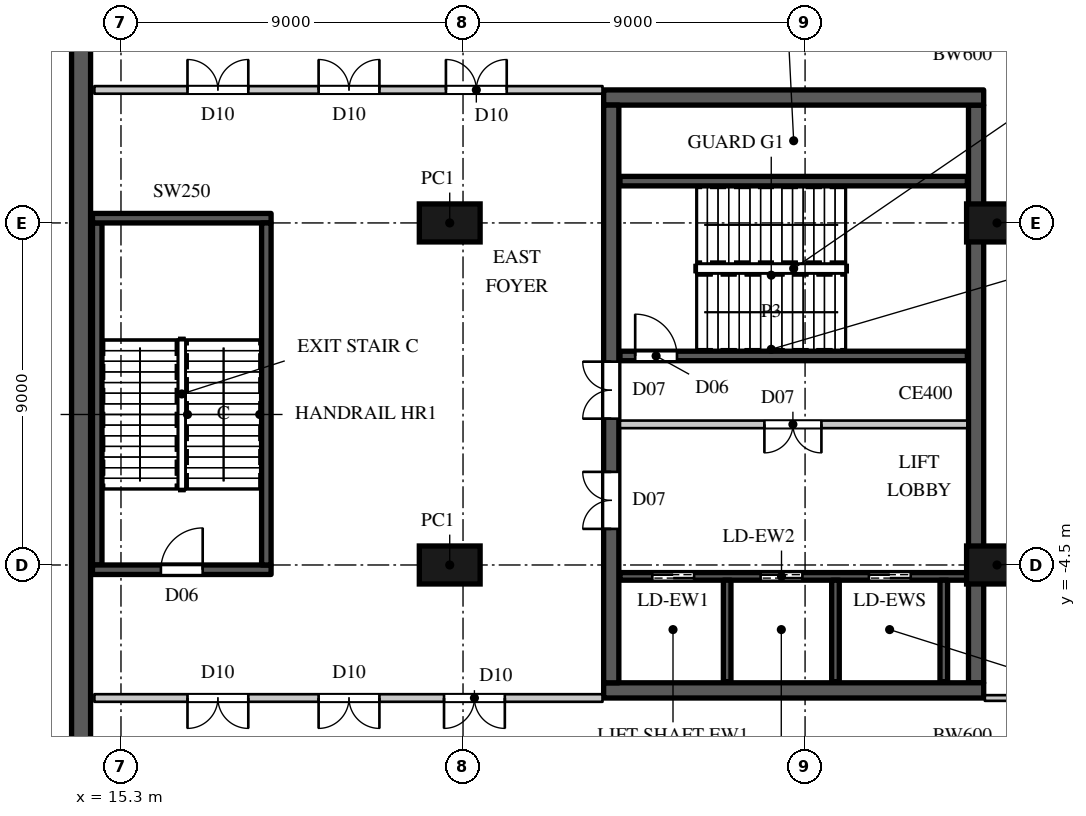
"""IFC4 building model, lengths in metres.
Left out: names, types, materials, properties, quantities, classifications, styles, units other than length and angle.
Written with IfcOpenShell. Run it as: python <this file> out.ifc"""

import sys

from ifc_helpers import new_model, si_unit, direction, frame, frame_2d, origin, origin_2d, place, context, subcontext, project, spatial, rectangle, extrude, element, fill, save


model = new_model("IFC4")
c1 = context("Model", 3, precision=1e-05, world=origin(), true_north=direction((0.0, 1.0)))
c2 = subcontext(c1, "Body", "Model", "MODEL_VIEW")
j1 = project(units=[si_unit("LENGTHUNIT", "METRE"), si_unit("PLANEANGLEUNIT", "RADIAN")], contexts=[c1])
p1 = place(None, origin())
s1 = spatial("IfcSite", under=j1, at=p1, CompositionType="ELEMENT")
p2 = place(p1, origin())
s2 = spatial("IfcBuilding", under=s1, at=p2, CompositionType="ELEMENT")
p3 = place(p2, frame((0.0, 0.0, 9.0)))
s3 = spatial("IfcBuildingStorey", under=s2, at=p3, CompositionType="ELEMENT", Elevation=9.0)
p4 = place(p3, frame((14.25, -19.5, 0.0), z_axis=(0.0, 0.0, 1.0), x_axis=(0.0, 1.0, 0.0)))
e1 = element("IfcWall", 1, at=p4, inside=s3, PredefinedType="SOLIDWALL", context=c2, shape_type="SweptSolid", body=[
    extrude(rectangle(XDim=39.0, YDim=0.5, at=frame_2d((19.5, 0.0))), origin(), (0.0, 0.0, 1.0), 10.0),
])
for number, where, z_axis, x_axis in (
    (2, (23.95, -4.5, 0.0), (0.0, 0.0, 1.0), (0.0, 1.0, 0.0)),
    (3, (23.95, 4.5, 0.0), (0.0, 0.0, 1.0), (0.0, 1.0, 0.0)),
    (4, (38.35, -4.5, 0.0), (0.0, 0.0, 1.0), (0.0, 1.0, 0.0)),
    (5, (38.35, 4.5, 0.0), (0.0, 0.0, 1.0), (0.0, 1.0, 0.0)),
):
    element("IfcColumn", number, at=place(p3, frame(where, z_axis=z_axis, x_axis=x_axis)), inside=s3, PredefinedType="COLUMN", context=c2, shape_type="SweptSolid", body=[
        extrude(rectangle(XDim=1.0, YDim=1.6, at=origin_2d()), origin(), (0.0, 0.0, 1.0), 10.0),
    ])
for number, where, z_axis, x_axis in (
    (6, (28.0, 7.8, 0.0), (0.0, 0.0, 1.0), (1.0, 0.0, 0.0)),
    (7, (28.0, -7.8, 0.0), (0.0, 0.0, 1.0), (1.0, 0.0, 0.0)),
):
    element("IfcWall", number, at=place(p3, frame(where, z_axis=z_axis, x_axis=x_axis)), inside=s3, PredefinedType="SHEAR", context=c2, shape_type="SweptSolid", body=[
        extrude(rectangle(XDim=10.0, YDim=0.4, at=frame_2d((5.0, 0.0))), origin(), (0.0, 0.0, 1.0), 10.0),
    ])
p5 = place(p3, frame((37.8, -7.6, 0.0), z_axis=(0.0, 0.0, 1.0), x_axis=(0.0, 1.0, 0.0)))
e8 = element("IfcWall", 8, at=p5, inside=s3, PredefinedType="SHEAR", context=c2, shape_type="SweptSolid", body=[
    extrude(rectangle(XDim=15.2, YDim=0.4, at=frame_2d((7.6, 0.0))), origin(), (0.0, 0.0, 1.0), 10.0),
])
p6 = place(p3, frame((28.2, -7.6, 0.0), z_axis=(0.0, 0.0, 1.0), x_axis=(0.0, 1.0, 0.0)))
e9 = element("IfcWall", 9, at=p6, inside=s3, PredefinedType="SHEAR", context=c2, shape_type="SweptSolid", body=[
    extrude(rectangle(XDim=15.2, YDim=0.4, at=frame_2d((7.6, 0.0))), origin(), (0.0, 0.0, 1.0), 10.0),
])
p7 = place(p6, frame((4.05, 0.0, 0.0)))
e10 = element("IfcOpeningElement", 10, at=p7, cuts=e9, PredefinedType="OPENING", context=c2, shape_type="SweptSolid", body=[
    extrude(rectangle(XDim=1.5, YDim=2.4, at=frame_2d((0.75, 1.2))), frame((0.0, 0.21, 0.0), z_axis=(0.0, -1.0, 0.0), x_axis=(1.0, 0.0, 0.0)), (0.0, 0.0, 1.0), 0.42),
])
p8 = place(p6, frame((6.95, 0.0, 0.0)))
e11 = element("IfcOpeningElement", 11, at=p8, cuts=e9, PredefinedType="OPENING", context=c2, shape_type="SweptSolid", body=[
    extrude(rectangle(XDim=1.5, YDim=2.4, at=frame_2d((0.75, 1.2))), frame((0.0, 0.21, 0.0), z_axis=(0.0, -1.0, 0.0), x_axis=(1.0, 0.0, 0.0)), (0.0, 0.0, 1.0), 0.42),
])
p9 = place(p3, frame((14.6, -8.0, 0.0), z_axis=(0.0, 0.0, 1.0), x_axis=(1.0, 0.0, 0.0)))
e12 = element("IfcWall", 12, at=p9, inside=s3, PredefinedType="PARTITIONING", context=c2, shape_type="SweptSolid", body=[
    extrude(rectangle(XDim=13.37, YDim=0.2, at=frame_2d((6.685, 0.0))), origin(), (0.0, 0.0, 1.0), 9.598),
])
p10 = place(p9, frame((5.9, 0.0, 0.0)))
e13 = element("IfcOpeningElement", 13, at=p10, cuts=e12, PredefinedType="OPENING", context=c2, shape_type="SweptSolid", body=[
    extrude(rectangle(XDim=1.6, YDim=2.4, at=frame_2d((0.8, 1.2))), frame((0.0, 0.11, 0.0), z_axis=(0.0, -1.0, 0.0), x_axis=(1.0, 0.0, 0.0)), (0.0, 0.0, 1.0), 0.22),
])
p11 = place(p9, frame((9.2, 0.0, 0.0)))
e14 = element("IfcOpeningElement", 14, at=p11, cuts=e12, PredefinedType="OPENING", context=c2, shape_type="SweptSolid", body=[
    extrude(rectangle(XDim=1.6, YDim=2.4, at=frame_2d((0.8, 1.2))), frame((0.0, 0.11, 0.0), z_axis=(0.0, -1.0, 0.0), x_axis=(1.0, 0.0, 0.0)), (0.0, 0.0, 1.0), 0.22),
])
p12 = place(p9, frame((2.45, 0.0, 0.0)))
e15 = element("IfcOpeningElement", 15, at=p12, cuts=e12, PredefinedType="OPENING", context=c2, shape_type="SweptSolid", body=[
    extrude(rectangle(XDim=1.6, YDim=2.4, at=frame_2d((0.8, 1.2))), frame((0.0, 0.11, 0.0), z_axis=(0.0, -1.0, 0.0), x_axis=(1.0, 0.0, 0.0)), (0.0, 0.0, 1.0), 0.22),
])
p13 = place(p3, frame((14.6, 8.0, 0.0), z_axis=(0.0, 0.0, 1.0), x_axis=(1.0, 0.0, 0.0)))
e16 = element("IfcWall", 16, at=p13, inside=s3, PredefinedType="PARTITIONING", context=c2, shape_type="SweptSolid", body=[
    extrude(rectangle(XDim=13.37, YDim=0.2, at=frame_2d((6.685, 0.0))), origin(), (0.0, 0.0, 1.0), 9.598),
])
p14 = place(p13, frame((5.9, 0.0, 0.0)))
e17 = element("IfcOpeningElement", 17, at=p14, cuts=e16, PredefinedType="OPENING", context=c2, shape_type="SweptSolid", body=[
    extrude(rectangle(XDim=1.6, YDim=2.4, at=frame_2d((0.8, 1.2))), frame((0.0, 0.11, 0.0), z_axis=(0.0, -1.0, 0.0), x_axis=(1.0, 0.0, 0.0)), (0.0, 0.0, 1.0), 0.22),
])
p15 = place(p13, frame((2.45, 0.0, 0.0)))
e18 = element("IfcOpeningElement", 18, at=p15, cuts=e16, PredefinedType="OPENING", context=c2, shape_type="SweptSolid", body=[
    extrude(rectangle(XDim=1.6, YDim=2.4, at=frame_2d((0.8, 1.2))), frame((0.0, 0.11, 0.0), z_axis=(0.0, -1.0, 0.0), x_axis=(1.0, 0.0, 0.0)), (0.0, 0.0, 1.0), 0.22),
])
p16 = place(p13, frame((9.25, 0.0, 0.0)))
e19 = element("IfcOpeningElement", 19, at=p16, cuts=e16, PredefinedType="OPENING", context=c2, shape_type="SweptSolid", body=[
    extrude(rectangle(XDim=1.6, YDim=2.4, at=frame_2d((0.8, 1.2))), frame((0.0, 0.11, 0.0), z_axis=(0.0, -1.0, 0.0), x_axis=(1.0, 0.0, 0.0)), (0.0, 0.0, 1.0), 0.22),
])
p17 = place(p3, frame((28.43, -0.8, 0.0), z_axis=(0.0, 0.0, 1.0), x_axis=(1.0, 0.0, 0.0)))
e20 = element("IfcWall", 20, at=p17, inside=s3, PredefinedType="PARTITIONING", context=c2, shape_type="SweptSolid", body=[
    extrude(rectangle(XDim=9.14, YDim=0.2, at=frame_2d((4.57, 0.0))), origin(), (0.0, 0.0, 1.0), 9.598),
])
p18 = place(p17, frame((3.8, 0.0, 0.0)))
e21 = element("IfcOpeningElement", 21, at=p18, cuts=e20, PredefinedType="OPENING", context=c2, shape_type="SweptSolid", body=[
    extrude(rectangle(XDim=1.5, YDim=2.4, at=frame_2d((0.75, 1.2))), frame((0.0, 0.11, 0.0), z_axis=(0.0, -1.0, 0.0), x_axis=(1.0, 0.0, 0.0)), (0.0, 0.0, 1.0), 0.22),
])
p19 = place(p3, frame((38.03, -8.0, 0.0), z_axis=(0.0, 0.0, 1.0), x_axis=(1.0, 0.0, 0.0)))
e22 = element("IfcWall", 22, at=p19, inside=s3, PredefinedType="PARTITIONING", context=c2, shape_type="SweptSolid", body=[
    extrude(rectangle(XDim=0.595, YDim=0.15, at=frame_2d((0.297, 0.0))), origin(), (0.0, 0.0, 1.0), 9.598),
])
p20 = place(p3, frame((28.43, -4.8, 0.0), z_axis=(0.0, 0.0, 1.0), x_axis=(1.0, 0.0, 0.0)))
e23 = element("IfcWall", 23, at=p20, inside=s3, PredefinedType="SHEAR", context=c2, shape_type="SweptSolid", body=[
    extrude(rectangle(XDim=9.13, YDim=0.2, at=frame_2d((4.565, 0.0))), origin(), (0.0, 0.0, 1.0), 9.598),
])
p21 = place(p20, frame((0.85, 0.0, 0.0)))
e24 = element("IfcOpeningElement", 24, at=p21, cuts=e23, PredefinedType="OPENING", context=c2, shape_type="SweptSolid", body=[
    extrude(rectangle(XDim=1.1, YDim=2.2, at=frame_2d((0.55, 1.1))), frame((0.0, 0.11, 0.0), z_axis=(0.0, -1.0, 0.0), x_axis=(1.0, 0.0, 0.0)), (0.0, 0.0, 1.0), 0.22),
])
p22 = place(p20, frame((3.7, 0.0, 0.0)))
e25 = element("IfcOpeningElement", 25, at=p22, cuts=e23, PredefinedType="OPENING", context=c2, shape_type="SweptSolid", body=[
    extrude(rectangle(XDim=1.1, YDim=2.2, at=frame_2d((0.55, 1.1))), frame((0.0, 0.11, 0.0), z_axis=(0.0, -1.0, 0.0), x_axis=(1.0, 0.0, 0.0)), (0.0, 0.0, 1.0), 0.22),
])
p23 = place(p20, frame((6.55, 0.0, 0.0)))
e26 = element("IfcOpeningElement", 26, at=p23, cuts=e23, PredefinedType="OPENING", context=c2, shape_type="SweptSolid", body=[
    extrude(rectangle(XDim=1.1, YDim=2.2, at=frame_2d((0.55, 1.1))), frame((0.0, 0.11, 0.0), z_axis=(0.0, -1.0, 0.0), x_axis=(1.0, 0.0, 0.0)), (0.0, 0.0, 1.0), 0.22),
])
for number, where, z_axis, x_axis in (
    (27, (31.25, -7.57, 0.0), (0.0, 0.0, 1.0), (0.0, 1.0, 0.0)),
    (28, (34.1, -7.57, 0.0), (0.0, 0.0, 1.0), (0.0, 1.0, 0.0)),
):
    element("IfcWall", number, at=place(p3, frame(where, z_axis=z_axis, x_axis=x_axis)), inside=s3, PredefinedType="SHEAR", context=c2, shape_type="SweptSolid", body=[
        extrude(rectangle(XDim=2.67, YDim=0.2, at=frame_2d((1.335, 0.0))), origin(), (0.0, 0.0, 1.0), 10.0),
    ])
p24 = place(p3, frame((36.95, -7.57, 0.0), z_axis=(0.0, 0.0, 1.0), x_axis=(0.0, 1.0, 0.0)))
e29 = element("IfcWall", 29, at=p24, inside=s3, PredefinedType="SHEAR", context=c2, shape_type="SweptSolid", body=[
    extrude(rectangle(XDim=2.67, YDim=0.2, at=frame_2d((1.335, 0.0))), origin(), (0.0, 0.0, 1.0), 9.598),
])
p25 = place(p3, frame((14.675, -4.5, 0.0), z_axis=(0.0, 0.0, 1.0), x_axis=(0.0, 1.0, 0.0)))
e30 = element("IfcWall", 30, at=p25, inside=s3, PredefinedType="SHEAR", context=c2, shape_type="SweptSolid", body=[
    extrude(rectangle(XDim=9.0, YDim=0.25, at=frame_2d((4.5, 0.0))), origin(), (0.0, 0.0, 1.0), 9.6),
])
p26 = place(p3, frame((14.55, -4.625, 0.0), z_axis=(0.0, 0.0, 1.0), x_axis=(1.0, 0.0, 0.0)))
e31 = element("IfcWall", 31, at=p26, inside=s3, PredefinedType="SHEAR", context=c2, shape_type="SweptSolid", body=[
    extrude(rectangle(XDim=4.7, YDim=0.25, at=frame_2d((2.35, 0.0))), origin(), (0.0, 0.0, 1.0), 9.6),
])
p27 = place(p26, frame((1.8, 0.0, 0.0)))
e32 = element("IfcOpeningElement", 32, at=p27, cuts=e31, PredefinedType="OPENING", context=c2, shape_type="SweptSolid", body=[
    extrude(rectangle(XDim=1.1, YDim=2.2, at=frame_2d((0.55, 1.1))), frame((0.0, 0.135, 0.0), z_axis=(0.0, -1.0, 0.0), x_axis=(1.0, 0.0, 0.0)), (0.0, 0.0, 1.0), 0.27),
])
p28 = place(p3, frame((14.55, 4.625, 0.0), z_axis=(0.0, 0.0, 1.0), x_axis=(1.0, 0.0, 0.0)))
e33 = element("IfcWall", 33, at=p28, inside=s3, PredefinedType="SHEAR", context=c2, shape_type="SweptSolid", body=[
    extrude(rectangle(XDim=4.7, YDim=0.25, at=frame_2d((2.35, 0.0))), origin(), (0.0, 0.0, 1.0), 9.6),
])
p29 = place(p3, frame((19.125, -4.5, 0.0), z_axis=(0.0, 0.0, 1.0), x_axis=(0.0, 1.0, 0.0)))
e34 = element("IfcWall", 34, at=p29, inside=s3, PredefinedType="SHEAR", context=c2, shape_type="SweptSolid", body=[
    extrude(rectangle(XDim=9.0, YDim=0.25, at=frame_2d((4.5, 0.0))), origin(), (0.0, 0.0, 1.0), 9.6),
])
p30 = place(p3, frame((28.43, 1.0, 0.0), z_axis=(0.0, 0.0, 1.0), x_axis=(1.0, 0.0, 0.0)))
e35 = element("IfcWall", 35, at=p30, inside=s3, PredefinedType="SHEAR", context=c2, shape_type="SweptSolid", body=[
    extrude(rectangle(XDim=9.14, YDim=0.25, at=frame_2d((4.57, 0.0))), origin(), (0.0, 0.0, 1.0), 9.598),
])
p31 = place(p30, frame((0.4, 0.0, 0.0)))
e36 = element("IfcOpeningElement", 36, at=p31, cuts=e35, PredefinedType="OPENING", context=c2, shape_type="SweptSolid", body=[
    extrude(rectangle(XDim=1.1, YDim=2.2, at=frame_2d((0.55, 1.1))), frame((0.0, 0.135, 0.0), z_axis=(0.0, -1.0, 0.0), x_axis=(1.0, 0.0, 0.0)), (0.0, 0.0, 1.0), 0.27),
])
p32 = place(p3, frame((28.43, 5.6, 0.0), z_axis=(0.0, 0.0, 1.0), x_axis=(1.0, 0.0, 0.0)))
e37 = element("IfcWall", 37, at=p32, inside=s3, PredefinedType="SHEAR", context=c2, shape_type="SweptSolid", body=[
    extrude(rectangle(XDim=9.14, YDim=0.25, at=frame_2d((4.57, 0.0))), origin(), (0.0, 0.0, 1.0), 9.598),
])
p33 = place(p31, origin())
e38 = element("IfcDoor", 38, at=p33, inside=s3, OperationType="SINGLE_SWING_LEFT", PredefinedType="DOOR", context=c2, shape_type="SweptSolid", body=[
    extrude(rectangle(XDim=1.1, YDim=2.2, at=frame_2d((0.55, 1.1))), frame((0.0, 0.025, 0.0), z_axis=(0.0, -1.0, 0.0), x_axis=(1.0, 0.0, 0.0)), (0.0, 0.0, 1.0), 0.05),
])
fill(e36, e38)
p34 = place(p18, origin())
e39 = element("IfcDoor", 39, at=p34, inside=s3, OperationType="DOUBLE_DOOR_SINGLE_SWING", PredefinedType="DOOR", context=c2, shape_type="SweptSolid", body=[
    extrude(rectangle(XDim=1.5, YDim=2.4, at=frame_2d((0.75, 1.2))), frame((0.0, 0.025, 0.0), z_axis=(0.0, -1.0, 0.0), x_axis=(1.0, 0.0, 0.0)), (0.0, 0.0, 1.0), 0.05),
])
fill(e21, e39)
p35 = place(p21, origin())
e40 = element("IfcDoor", 40, at=p35, inside=s3, OperationType="DOUBLE_DOOR_SLIDING", PredefinedType="DOOR", context=c2, shape_type="SweptSolid", body=[
    extrude(rectangle(XDim=1.1, YDim=2.2, at=frame_2d((0.55, 1.1))), frame((0.0, 0.025, 0.0), z_axis=(0.0, -1.0, 0.0), x_axis=(1.0, 0.0, 0.0)), (0.0, 0.0, 1.0), 0.05),
])
fill(e24, e40)
p36 = place(p22, origin())
e41 = element("IfcDoor", 41, at=p36, inside=s3, OperationType="DOUBLE_DOOR_SLIDING", PredefinedType="DOOR", context=c2, shape_type="SweptSolid", body=[
    extrude(rectangle(XDim=1.1, YDim=2.2, at=frame_2d((0.55, 1.1))), frame((0.0, 0.025, 0.0), z_axis=(0.0, -1.0, 0.0), x_axis=(1.0, 0.0, 0.0)), (0.0, 0.0, 1.0), 0.05),
])
fill(e25, e41)
p37 = place(p23, origin())
e42 = element("IfcDoor", 42, at=p37, inside=s3, OperationType="DOUBLE_DOOR_SLIDING", PredefinedType="DOOR", context=c2, shape_type="SweptSolid", body=[
    extrude(rectangle(XDim=1.1, YDim=2.2, at=frame_2d((0.55, 1.1))), frame((0.0, 0.025, 0.0), z_axis=(0.0, -1.0, 0.0), x_axis=(1.0, 0.0, 0.0)), (0.0, 0.0, 1.0), 0.05),
])
fill(e26, e42)
p38 = place(p14, origin())
e43 = element("IfcDoor", 43, at=p38, inside=s3, OperationType="DOUBLE_DOOR_SINGLE_SWING", PredefinedType="DOOR", context=c2, shape_type="SweptSolid", body=[
    extrude(rectangle(XDim=1.6, YDim=2.4, at=frame_2d((0.8, 1.2))), frame((0.0, 0.025, 0.0), z_axis=(0.0, -1.0, 0.0), x_axis=(1.0, 0.0, 0.0)), (0.0, 0.0, 1.0), 0.05),
])
fill(e17, e43)
p39 = place(p15, origin())
e44 = element("IfcDoor", 44, at=p39, inside=s3, OperationType="DOUBLE_DOOR_SINGLE_SWING", PredefinedType="DOOR", context=c2, shape_type="SweptSolid", body=[
    extrude(rectangle(XDim=1.6, YDim=2.4, at=frame_2d((0.8, 1.2))), frame((0.0, 0.025, 0.0), z_axis=(0.0, -1.0, 0.0), x_axis=(1.0, 0.0, 0.0)), (0.0, 0.0, 1.0), 0.05),
])
fill(e18, e44)
p40 = place(p16, origin())
e45 = element("IfcDoor", 45, at=p40, inside=s3, OperationType="DOUBLE_DOOR_SINGLE_SWING", PredefinedType="DOOR", context=c2, shape_type="SweptSolid", body=[
    extrude(rectangle(XDim=1.6, YDim=2.4, at=frame_2d((0.8, 1.2))), frame((0.0, 0.025, 0.0), z_axis=(0.0, -1.0, 0.0), x_axis=(1.0, 0.0, 0.0)), (0.0, 0.0, 1.0), 0.05),
])
fill(e19, e45)
p41 = place(p10, origin())
e46 = element("IfcDoor", 46, at=p41, inside=s3, OperationType="DOUBLE_DOOR_SINGLE_SWING", PredefinedType="DOOR", context=c2, shape_type="SweptSolid", body=[
    extrude(rectangle(XDim=1.6, YDim=2.4, at=frame_2d((0.8, 1.2))), frame((0.0, 0.025, 0.0), z_axis=(0.0, -1.0, 0.0), x_axis=(1.0, 0.0, 0.0)), (0.0, 0.0, 1.0), 0.05),
])
fill(e13, e46)
p42 = place(p11, origin())
e47 = element("IfcDoor", 47, at=p42, inside=s3, OperationType="DOUBLE_DOOR_SINGLE_SWING", PredefinedType="DOOR", context=c2, shape_type="SweptSolid", body=[
    extrude(rectangle(XDim=1.6, YDim=2.4, at=frame_2d((0.8, 1.2))), frame((0.0, 0.025, 0.0), z_axis=(0.0, -1.0, 0.0), x_axis=(1.0, 0.0, 0.0)), (0.0, 0.0, 1.0), 0.05),
])
fill(e14, e47)
p43 = place(p12, origin())
e48 = element("IfcDoor", 48, at=p43, inside=s3, OperationType="DOUBLE_DOOR_SINGLE_SWING", PredefinedType="DOOR", context=c2, shape_type="SweptSolid", body=[
    extrude(rectangle(XDim=1.6, YDim=2.4, at=frame_2d((0.8, 1.2))), frame((0.0, 0.025, 0.0), z_axis=(0.0, -1.0, 0.0), x_axis=(1.0, 0.0, 0.0)), (0.0, 0.0, 1.0), 0.05),
])
fill(e15, e48)
p44 = place(p7, origin())
e49 = element("IfcDoor", 49, at=p44, inside=s3, OperationType="DOUBLE_DOOR_SINGLE_SWING", PredefinedType="DOOR", context=c2, shape_type="SweptSolid", body=[
    extrude(rectangle(XDim=1.5, YDim=2.4, at=frame_2d((0.75, 1.2))), frame((0.0, 0.025, 0.0), z_axis=(0.0, -1.0, 0.0), x_axis=(1.0, 0.0, 0.0)), (0.0, 0.0, 1.0), 0.05),
])
fill(e10, e49)
p45 = place(p8, origin())
e50 = element("IfcDoor", 50, at=p45, inside=s3, OperationType="DOUBLE_DOOR_SINGLE_SWING", PredefinedType="DOOR", context=c2, shape_type="SweptSolid", body=[
    extrude(rectangle(XDim=1.5, YDim=2.4, at=frame_2d((0.75, 1.2))), frame((0.0, 0.025, 0.0), z_axis=(0.0, -1.0, 0.0), x_axis=(1.0, 0.0, 0.0)), (0.0, 0.0, 1.0), 0.05),
])
fill(e11, e50)
p46 = place(p27, origin())
e51 = element("IfcDoor", 51, at=p46, inside=s3, OperationType="SINGLE_SWING_RIGHT", PredefinedType="DOOR", context=c2, shape_type="SweptSolid", body=[
    extrude(rectangle(XDim=1.1, YDim=2.2, at=frame_2d((0.55, 1.1))), frame((0.0, 0.025, 0.0), z_axis=(0.0, -1.0, 0.0), x_axis=(1.0, 0.0, 0.0)), (0.0, 0.0, 1.0), 0.05),
])
fill(e32, e51)
save(model, sys.argv[1])
